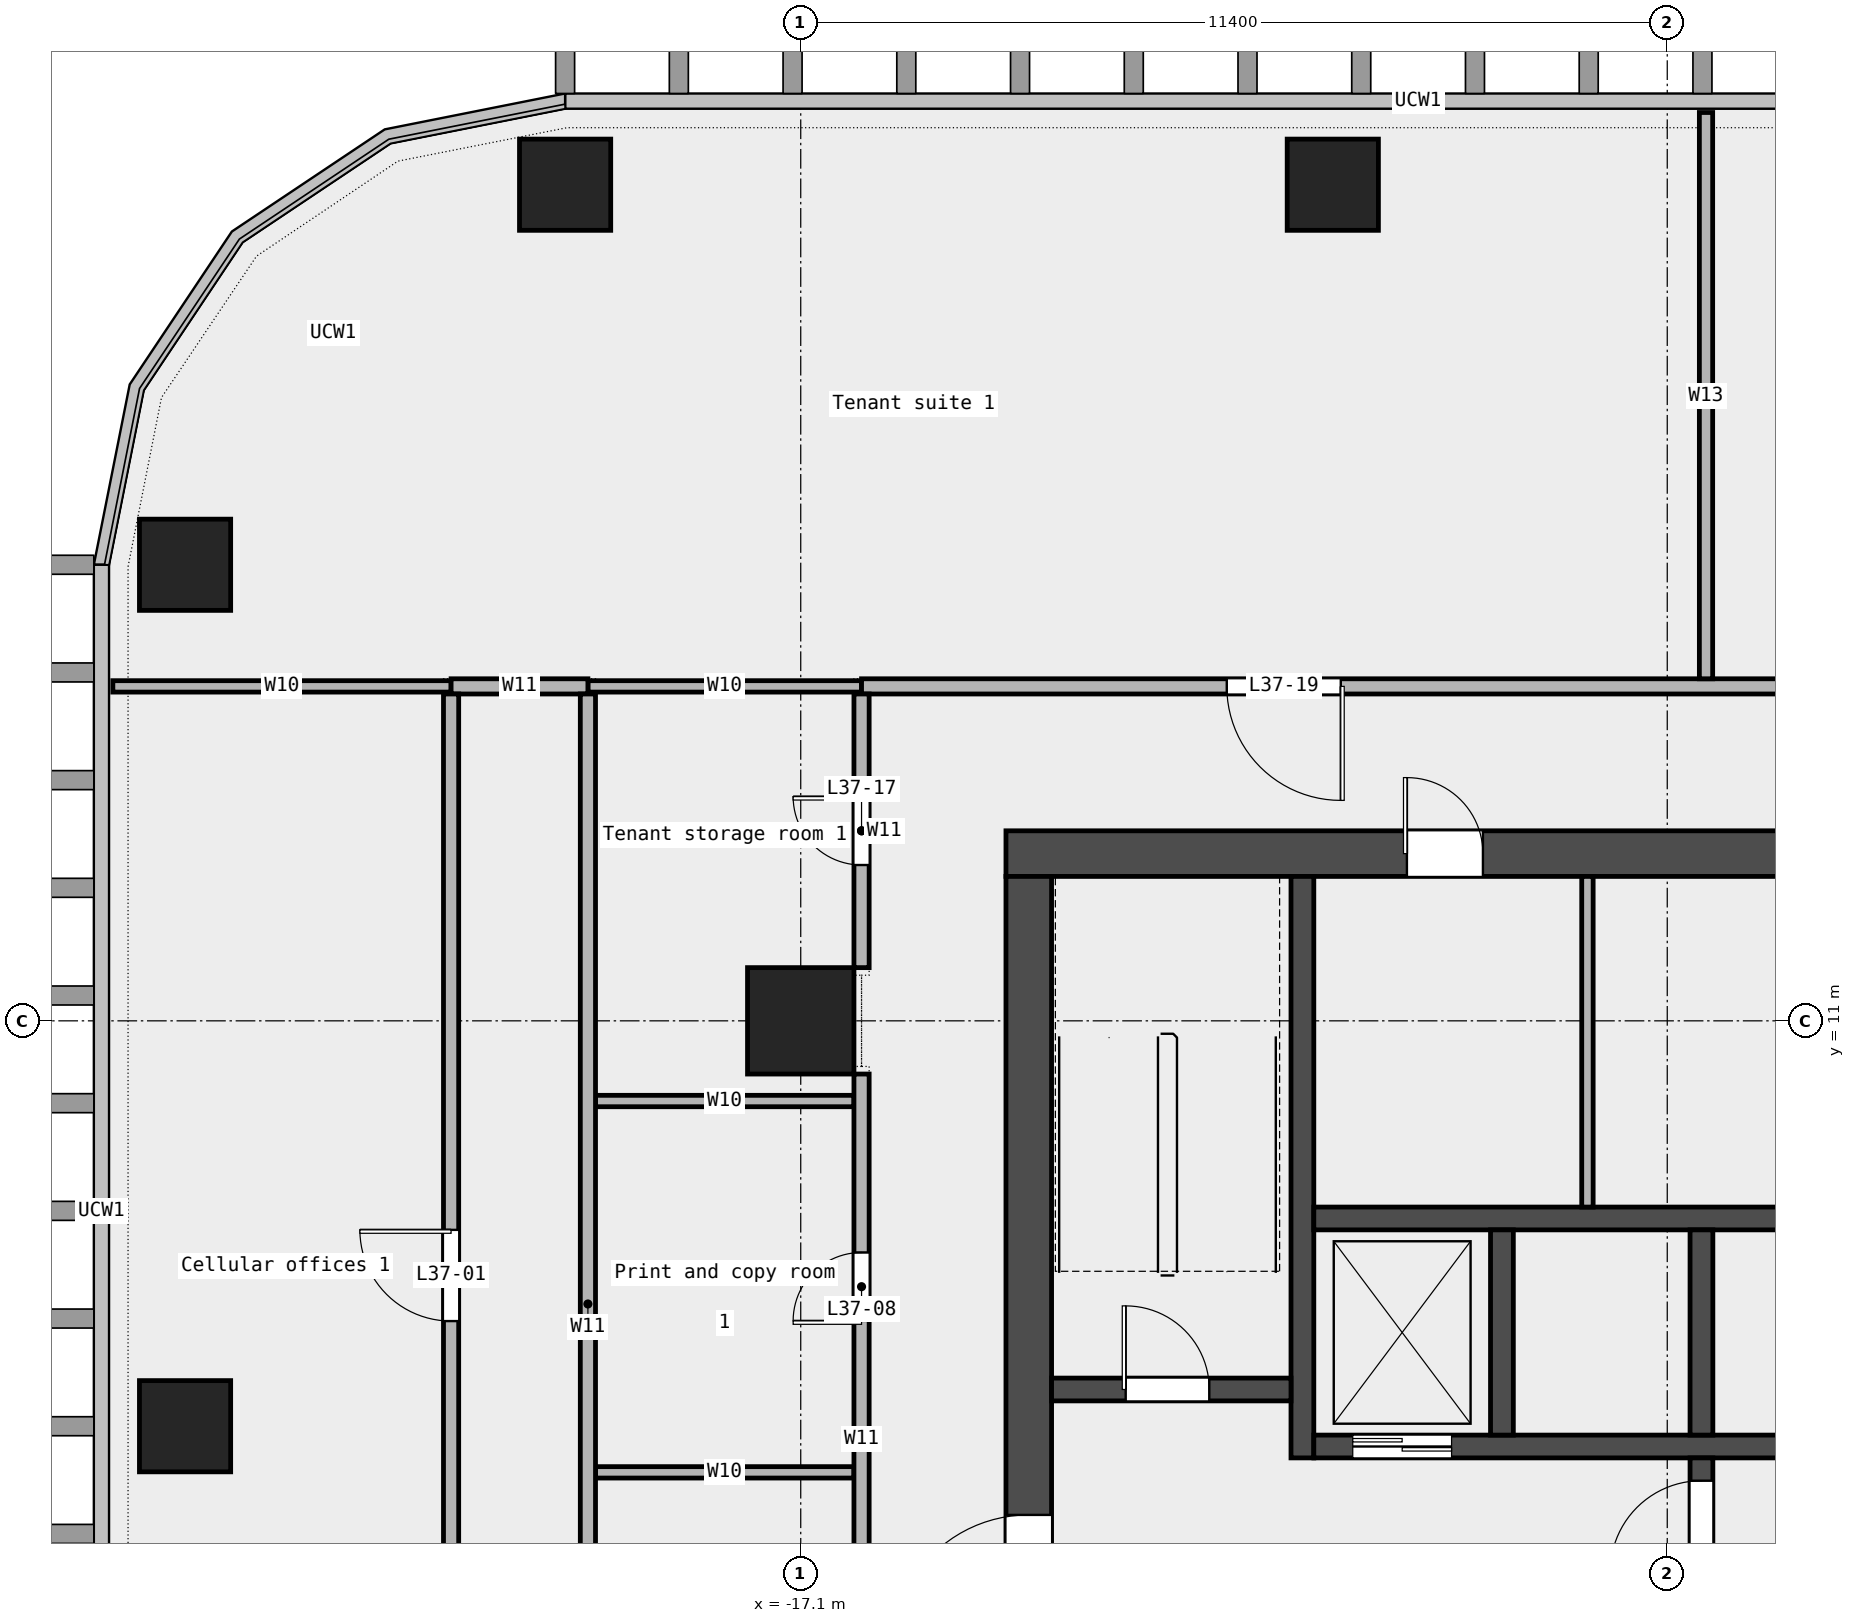
"""IFC4 building model, lengths in metres.
Left out: names, types, materials, properties, quantities, classifications, styles, units other than length and angle.
Written with IfcOpenShell. Run it as: python <this file> out.ifc"""

import sys

from ifc_helpers import new_model, si_unit, direction, frame, frame_2d, origin, origin_2d, place, context, subcontext, project, spatial, rectangle, extrude, element, fill, save


model = new_model("IFC4")
c1 = context("Model", 3, precision=1e-05, world=origin(), true_north=direction((0.0, 1.0)))
c2 = subcontext(c1, "Body", "Model", "MODEL_VIEW")
j1 = project(units=[si_unit("LENGTHUNIT", "METRE"), si_unit("PLANEANGLEUNIT", "RADIAN")], contexts=[c1])
p1 = place(None, origin())
s1 = spatial("IfcSite", under=j1, at=p1, CompositionType="ELEMENT")
p2 = place(p1, origin())
s2 = spatial("IfcBuilding", under=s1, at=p2, CompositionType="ELEMENT")
p3 = place(p2, frame((0.0, 0.0, 181.0)))
s3 = spatial("IfcBuildingStorey", under=s2, at=p3, CompositionType="ELEMENT", Elevation=181.0)
for number, where, z_axis, x_axis in (
    (1, (-10.1, 22.0, 0.0), (0.0, 0.0, 1.0), (1.0, 0.0, 0.0)),
    (2, (-20.2, 22.0, 0.0), (0.0, 0.0, 1.0), (1.0, 0.0, 0.0)),
    (3, (-25.2, 17.0, 0.0), (0.0, 0.0, 1.0), (1.0, 0.0, 0.0)),
    (4, (-25.2, 5.667, 0.0), (0.0, 0.0, 1.0), (1.0, 0.0, 0.0)),
):
    element("IfcColumn", number, at=place(p3, frame(where, z_axis=z_axis, x_axis=x_axis)), inside=s3, PredefinedType="COLUMN", context=c2, shape_type="SweptSolid", body=[
        extrude(rectangle(XDim=1.2, YDim=1.2, at=origin_2d()), origin(), (0.0, 0.0, 1.0), 3.6),
    ])
p4 = place(p3, frame((-17.1, 11.0, 0.0), z_axis=(0.0, 0.0, 1.0), x_axis=(1.0, 0.0, 0.0)))
e5 = element("IfcColumn", 5, at=p4, inside=s3, PredefinedType="COLUMN", context=c2, shape_type="SweptSolid", body=[
    extrude(rectangle(XDim=1.4, YDim=1.4, at=origin_2d()), origin(), (0.0, 0.0, 1.0), 3.6),
])
for number, where, z_axis, x_axis in (
    (6, (-19.8, 5.06, 0.0), (0.0, 0.0, 1.0), (1.0, 0.0, 0.0)),
    (7, (-19.8, 9.945, 0.0), (0.0, 0.0, 1.0), (1.0, 0.0, 0.0)),
):
    element("IfcWall", number, at=place(p3, frame(where, z_axis=z_axis, x_axis=x_axis)), inside=s3, PredefinedType="PARTITIONING", context=c2, shape_type="SweptSolid", body=[
        extrude(rectangle(XDim=3.4, YDim=0.15, at=frame_2d((1.7, 0.0))), origin(), (0.0, 0.0, 1.0), 3.6),
    ])
p5 = place(p3, frame((-26.15, 15.4, 0.0), z_axis=(0.0, 0.0, 1.0), x_axis=(1.0, 0.0, 0.0)))
e8 = element("IfcWall", 8, at=p5, inside=s3, PredefinedType="PARTITIONING", context=c2, shape_type="SweptSolid", body=[
    extrude(rectangle(XDim=4.45, YDim=0.15, at=frame_2d((2.225, 0.0))), origin(), (0.0, 0.0, 1.0), 3.6),
])
p6 = place(p3, frame((-19.9, 15.4, 0.0), z_axis=(0.0, 0.0, 1.0), x_axis=(1.0, 0.0, 0.0)))
e9 = element("IfcWall", 9, at=p6, inside=s3, PredefinedType="PARTITIONING", context=c2, shape_type="SweptSolid", body=[
    extrude(rectangle(XDim=3.6, YDim=0.15, at=frame_2d((1.8, 0.0))), origin(), (0.0, 0.0, 1.0), 3.6),
])
p7 = place(p3, frame((-21.7, 15.4, 0.0), z_axis=(0.0, 0.0, 1.0), x_axis=(1.0, 0.0, 0.0)))
e10 = element("IfcWall", 10, at=p7, inside=s3, PredefinedType="PARTITIONING", context=c2, shape_type="SweptSolid", body=[
    extrude(rectangle(XDim=1.8, YDim=0.2, at=frame_2d((0.9, 0.0))), origin(), (0.0, 0.0, 1.0), 3.6),
])
p8 = place(p3, frame((-16.3, 15.4, 0.0), z_axis=(0.0, 0.0, 1.0), x_axis=(1.0, 0.0, 0.0)))
e11 = element("IfcWall", 11, at=p8, inside=s3, PredefinedType="PARTITIONING", context=c2, shape_type="SweptSolid", body=[
    extrude(rectangle(XDim=32.6, YDim=0.2, at=frame_2d((16.3, 0.0))), origin(), (0.0, 0.0, 1.0), 3.6),
])
p9 = place(p8, frame((24.677, 0.0, 0.0)))
e12 = element("IfcOpeningElement", 12, at=p9, cuts=e11, PredefinedType="OPENING", context=c2, shape_type="SweptSolid", body=[
    extrude(rectangle(XDim=1.2, YDim=2.1, at=frame_2d((0.6, 1.05))), frame((0.0, 0.112, 0.0), z_axis=(0.0, -1.0, 0.0), x_axis=(1.0, 0.0, 0.0)), (0.0, 0.0, 1.0), 0.224),
])
p10 = place(p8, frame((4.805, 0.0, 0.0)))
e13 = element("IfcOpeningElement", 13, at=p10, cuts=e11, PredefinedType="OPENING", context=c2, shape_type="SweptSolid", body=[
    extrude(rectangle(XDim=1.5, YDim=2.1, at=frame_2d((0.75, 1.05))), frame((0.0, 0.112, 0.0), z_axis=(0.0, -1.0, 0.0), x_axis=(1.0, 0.0, 0.0)), (0.0, 0.0, 1.0), 0.224),
])
p11 = place(p8, frame((14.228, 0.0, 0.0)))
e14 = element("IfcOpeningElement", 14, at=p11, cuts=e11, PredefinedType="OPENING", context=c2, shape_type="SweptSolid", body=[
    extrude(rectangle(XDim=1.2, YDim=2.1, at=frame_2d((0.6, 1.05))), frame((0.0, 0.112, 0.0), z_axis=(0.0, -1.0, 0.0), x_axis=(1.0, 0.0, 0.0)), (0.0, 0.0, 1.0), 0.224),
])
p12 = place(p3, frame((-21.7, -9.0, 0.0), z_axis=(0.0, 0.0, 1.0), x_axis=(0.0, 1.0, 0.0)))
e15 = element("IfcWall", 15, at=p12, inside=s3, PredefinedType="PARTITIONING", context=c2, shape_type="SweptSolid", body=[
    extrude(rectangle(XDim=24.3, YDim=0.2, at=frame_2d((12.15, 0.0))), origin(), (0.0, 0.0, 1.0), 3.6),
])
p13 = place(p12, frame((16.05, 0.0, 0.0)))
e16 = element("IfcOpeningElement", 16, at=p13, cuts=e15, PredefinedType="OPENING", context=c2, shape_type="SweptSolid", body=[
    extrude(rectangle(XDim=1.2, YDim=2.1, at=frame_2d((0.6, 1.05))), frame((0.0, 0.112, 0.0), z_axis=(0.0, -1.0, 0.0), x_axis=(1.0, 0.0, 0.0)), (0.0, 0.0, 1.0), 0.224),
])
p14 = place(p3, frame((-19.9, -0.75, 0.0), z_axis=(0.0, 0.0, 1.0), x_axis=(0.0, 1.0, 0.0)))
e17 = element("IfcWall", 17, at=p14, inside=s3, PredefinedType="PARTITIONING", context=c2, shape_type="SweptSolid", body=[
    extrude(rectangle(XDim=16.05, YDim=0.2, at=frame_2d((8.025, 0.0))), origin(), (0.0, 0.0, 1.0), 3.6),
])
p15 = place(p3, frame((-16.3, 0.7, 0.0), z_axis=(0.0, 0.0, 1.0), x_axis=(0.0, 1.0, 0.0)))
e18 = element("IfcWall", 18, at=p15, inside=s3, PredefinedType="PARTITIONING", context=c2, shape_type="SweptSolid", body=[
    extrude(rectangle(XDim=9.6, YDim=0.2, at=frame_2d((4.8, 0.0))), origin(), (0.0, 0.0, 1.0), 3.6),
])
p16 = place(p15, frame((1.73, 0.0, 0.0)))
e19 = element("IfcOpeningElement", 19, at=p16, cuts=e18, PredefinedType="OPENING", context=c2, shape_type="SweptSolid", body=[
    extrude(rectangle(XDim=0.9, YDim=2.1, at=frame_2d((0.45, 1.05))), frame((0.0, 0.112, 0.0), z_axis=(0.0, -1.0, 0.0), x_axis=(1.0, 0.0, 0.0)), (0.0, 0.0, 1.0), 0.224),
])
p17 = place(p15, frame((6.353, 0.0, 0.0)))
e20 = element("IfcOpeningElement", 20, at=p17, cuts=e18, PredefinedType="OPENING", context=c2, shape_type="SweptSolid", body=[
    extrude(rectangle(XDim=0.9, YDim=2.1, at=frame_2d((0.45, 1.05))), frame((0.0, 0.112, 0.0), z_axis=(0.0, -1.0, 0.0), x_axis=(1.0, 0.0, 0.0)), (0.0, 0.0, 1.0), 0.224),
])
p18 = place(p3, frame((-16.3, 11.7, 0.0), z_axis=(0.0, 0.0, 1.0), x_axis=(0.0, 1.0, 0.0)))
e21 = element("IfcWall", 21, at=p18, inside=s3, PredefinedType="PARTITIONING", context=c2, shape_type="SweptSolid", body=[
    extrude(rectangle(XDim=3.6, YDim=0.2, at=frame_2d((1.8, 0.0))), origin(), (0.0, 0.0, 1.0), 3.6),
])
p19 = place(p18, frame((1.35, 0.0, 0.0)))
e22 = element("IfcOpeningElement", 22, at=p19, cuts=e21, PredefinedType="OPENING", context=c2, shape_type="SweptSolid", body=[
    extrude(rectangle(XDim=0.9, YDim=2.1, at=frame_2d((0.45, 1.05))), frame((0.0, 0.112, 0.0), z_axis=(0.0, -1.0, 0.0), x_axis=(1.0, 0.0, 0.0)), (0.0, 0.0, 1.0), 0.224),
])
p20 = place(p3, frame((-5.19, 15.5, 0.0), z_axis=(0.0, 0.0, 1.0), x_axis=(0.0, 1.0, 0.0)))
e23 = element("IfcWall", 23, at=p20, inside=s3, PredefinedType="PARTITIONING", context=c2, shape_type="SweptSolid", body=[
    extrude(rectangle(XDim=7.45, YDim=0.175, at=frame_2d((3.725, 0.0))), origin(), (0.0, 0.0, 1.0), 3.6),
])
p21 = place(p3, frame((-14.4, 13.2, 0.0), z_axis=(0.0, 0.0, 1.0), x_axis=(1.0, 0.0, 0.0)))
e24 = element("IfcWall", 24, at=p21, inside=s3, PredefinedType="SHEAR", context=c2, shape_type="SweptSolid", body=[
    extrude(rectangle(XDim=28.8, YDim=0.6, at=frame_2d((14.4, 0.0))), origin(), (0.0, 0.0, 1.0), 3.7),
])
p22 = place(p21, frame((5.275, 0.0, 0.0)))
e25 = element("IfcOpeningElement", 25, at=p22, cuts=e24, PredefinedType="OPENING", context=c2, shape_type="SweptSolid", body=[
    extrude(rectangle(XDim=1.0, YDim=2.1, at=frame_2d((0.5, 1.05))), frame((0.0, 0.312, 0.0), z_axis=(0.0, -1.0, 0.0), x_axis=(1.0, 0.0, 0.0)), (0.0, 0.0, 1.0), 0.624),
])
p23 = place(p21, frame((10.525, 0.0, 0.0)))
e26 = element("IfcOpeningElement", 26, at=p23, cuts=e24, PredefinedType="OPENING", context=c2, shape_type="SweptSolid", body=[
    extrude(rectangle(XDim=1.0, YDim=2.1, at=frame_2d((0.5, 1.05))), frame((0.0, 0.312, 0.0), z_axis=(0.0, -1.0, 0.0), x_axis=(1.0, 0.0, 0.0)), (0.0, 0.0, 1.0), 0.624),
])
p24 = place(p21, frame((15.587, 0.0, 0.0)))
e27 = element("IfcOpeningElement", 27, at=p24, cuts=e24, PredefinedType="OPENING", context=c2, shape_type="SweptSolid", body=[
    extrude(rectangle(XDim=1.0, YDim=2.1, at=frame_2d((0.5, 1.05))), frame((0.0, 0.312, 0.0), z_axis=(0.0, -1.0, 0.0), x_axis=(1.0, 0.0, 0.0)), (0.0, 0.0, 1.0), 0.624),
])
p25 = place(p21, frame((19.15, 0.0, 0.0)))
e28 = element("IfcOpeningElement", 28, at=p25, cuts=e24, PredefinedType="OPENING", context=c2, shape_type="SweptSolid", body=[
    extrude(rectangle(XDim=1.0, YDim=2.1, at=frame_2d((0.5, 1.05))), frame((0.0, 0.312, 0.0), z_axis=(0.0, -1.0, 0.0), x_axis=(1.0, 0.0, 0.0)), (0.0, 0.0, 1.0), 0.624),
])
p26 = place(p21, frame((22.712, 0.0, 0.0)))
e29 = element("IfcOpeningElement", 29, at=p26, cuts=e24, PredefinedType="OPENING", context=c2, shape_type="SweptSolid", body=[
    extrude(rectangle(XDim=1.0, YDim=2.1, at=frame_2d((0.5, 1.05))), frame((0.0, 0.312, 0.0), z_axis=(0.0, -1.0, 0.0), x_axis=(1.0, 0.0, 0.0)), (0.0, 0.0, 1.0), 0.624),
])
p27 = place(p3, frame((-14.1, -6.6, 0.0), z_axis=(0.0, 0.0, 1.0), x_axis=(0.0, 1.0, 0.0)))
e30 = element("IfcWall", 30, at=p27, inside=s3, PredefinedType="SHEAR", context=c2, shape_type="SweptSolid", body=[
    extrude(rectangle(XDim=19.5, YDim=0.6, at=frame_2d((9.75, 0.0))), origin(), (0.0, 0.0, 1.0), 3.7),
])
p28 = place(p27, frame((9.3, 0.0, 0.0)))
e31 = element("IfcOpeningElement", 31, at=p28, cuts=e30, PredefinedType="OPENING", context=c2, shape_type="SweptSolid", body=[
    extrude(rectangle(XDim=1.8, YDim=2.1, at=frame_2d((0.9, 1.05))), frame((0.0, 0.312, 0.0), z_axis=(0.0, -1.0, 0.0), x_axis=(1.0, 0.0, 0.0)), (0.0, 0.0, 1.0), 0.624),
])
p29 = place(p3, frame((-10.5, 5.25, 0.0), z_axis=(0.0, 0.0, 1.0), x_axis=(0.0, 1.0, 0.0)))
e32 = element("IfcWall", 32, at=p29, inside=s3, PredefinedType="SHEAR", context=c2, shape_type="SweptSolid", body=[
    extrude(rectangle(XDim=7.65, YDim=0.3, at=frame_2d((3.825, 0.0))), origin(), (0.0, 0.0, 1.0), 3.7),
])
p30 = place(p3, frame((-13.8, 6.15, 0.0), z_axis=(0.0, 0.0, 1.0), x_axis=(1.0, 0.0, 0.0)))
e33 = element("IfcWall", 33, at=p30, inside=s3, PredefinedType="SOLIDWALL", context=c2, shape_type="SweptSolid", body=[
    extrude(rectangle(XDim=3.15, YDim=0.3, at=frame_2d((1.575, 0.0))), origin(), (0.0, 0.0, 1.0), 3.7),
])
p31 = place(p30, frame((0.975, 0.0, 0.0)))
e34 = element("IfcOpeningElement", 34, at=p31, cuts=e33, PredefinedType="OPENING", context=c2, shape_type="SweptSolid", body=[
    extrude(rectangle(XDim=1.1, YDim=2.1, at=frame_2d((0.55, 1.05))), frame((0.0, 0.162, 0.0), z_axis=(0.0, -1.0, 0.0), x_axis=(1.0, 0.0, 0.0)), (0.0, 0.0, 1.0), 0.324),
])
p32 = place(p3, frame((-10.35, 5.4, 0.0), z_axis=(0.0, 0.0, 1.0), x_axis=(1.0, 0.0, 0.0)))
e35 = element("IfcWall", 35, at=p32, inside=s3, PredefinedType="SOLIDWALL", context=c2, shape_type="SweptSolid", body=[
    extrude(rectangle(XDim=20.7, YDim=0.3, at=frame_2d((10.35, 0.0))), origin(), (0.0, 0.0, 1.0), 3.7),
])
p33 = place(p32, frame((0.512, 0.0, 0.0)))
e36 = element("IfcOpeningElement", 36, at=p33, cuts=e35, PredefinedType="OPENING", context=c2, shape_type="SweptSolid", body=[
    extrude(rectangle(XDim=1.3, YDim=2.1, at=frame_2d((0.65, 1.05))), frame((0.0, 0.162, 0.0), z_axis=(0.0, -1.0, 0.0), x_axis=(1.0, 0.0, 0.0)), (0.0, 0.0, 1.0), 0.324),
])
p34 = place(p3, frame((-10.35, 8.4, 0.0), z_axis=(0.0, 0.0, 1.0), x_axis=(1.0, 0.0, 0.0)))
e37 = element("IfcWall", 37, at=p34, inside=s3, PredefinedType="SOLIDWALL", context=c2, shape_type="SweptSolid", body=[
    extrude(rectangle(XDim=20.7, YDim=0.3, at=frame_2d((10.35, 0.0))), origin(), (0.0, 0.0, 1.0), 3.7),
])
for number, where, z_axis, x_axis in (
    (38, (-7.875, 5.55, 0.0), (0.0, 0.0, 1.0), (0.0, 1.0, 0.0)),
    (39, (-5.25, 5.55, 0.0), (0.0, 0.0, 1.0), (0.0, 1.0, 0.0)),
):
    element("IfcWall", number, at=place(p3, frame(where, z_axis=z_axis, x_axis=x_axis)), inside=s3, PredefinedType="SOLIDWALL", context=c2, shape_type="SweptSolid", body=[
        extrude(rectangle(XDim=2.7, YDim=0.3, at=frame_2d((1.35, 0.0))), origin(), (0.0, 0.0, 1.0), 3.7),
    ])
p35 = place(p3, frame((-5.25, 1.95, 0.0), z_axis=(0.0, 0.0, 1.0), x_axis=(0.0, 1.0, 0.0)))
e40 = element("IfcWall", 40, at=p35, inside=s3, PredefinedType="SOLIDWALL", context=c2, shape_type="SweptSolid", body=[
    extrude(rectangle(XDim=3.3, YDim=0.3, at=frame_2d((1.65, 0.0))), origin(), (0.0, 0.0, 1.0), 3.7),
])
p36 = place(p35, frame((0.3, 0.0, 0.0)))
e41 = element("IfcOpeningElement", 41, at=p36, cuts=e40, PredefinedType="OPENING", context=c2, shape_type="SweptSolid", body=[
    extrude(rectangle(XDim=1.2, YDim=2.1, at=frame_2d((0.6, 1.05))), frame((0.0, 0.162, 0.0), z_axis=(0.0, -1.0, 0.0), x_axis=(1.0, 0.0, 0.0)), (0.0, 0.0, 1.0), 0.324),
])
p37 = place(p35, frame((1.8, 0.0, 0.0)))
e42 = element("IfcOpeningElement", 42, at=p37, cuts=e40, PredefinedType="OPENING", context=c2, shape_type="SweptSolid", body=[
    extrude(rectangle(XDim=1.2, YDim=2.1, at=frame_2d((0.6, 1.05))), frame((0.0, 0.162, 0.0), z_axis=(0.0, -1.0, 0.0), x_axis=(1.0, 0.0, 0.0)), (0.0, 0.0, 1.0), 0.324),
])
p38 = place(p3, frame((-6.75, 8.55, 0.0), z_axis=(0.0, 0.0, 1.0), x_axis=(0.0, 1.0, 0.0)))
e43 = element("IfcWall", 43, at=p38, inside=s3, PredefinedType="PARTITIONING", context=c2, shape_type="SweptSolid", body=[
    extrude(rectangle(XDim=4.35, YDim=0.15, at=frame_2d((2.175, 0.0))), origin(), (0.0, 0.0, 1.0), 3.7),
])
p39 = place(p13, origin())
e44 = element("IfcDoor", 44, at=p39, inside=s3, OperationType="SINGLE_SWING_RIGHT", PredefinedType="DOOR", context=c2, shape_type="SweptSolid", body=[
    extrude(rectangle(XDim=1.2, YDim=2.1, at=frame_2d((0.6, 1.05))), frame((0.0, 0.025, 0.0), z_axis=(0.0, -1.0, 0.0), x_axis=(1.0, 0.0, 0.0)), (0.0, 0.0, 1.0), 0.05),
])
fill(e16, e44)
p40 = place(p17, origin())
e45 = element("IfcDoor", 45, at=p40, inside=s3, OperationType="SINGLE_SWING_LEFT", PredefinedType="DOOR", context=c2, shape_type="SweptSolid", body=[
    extrude(rectangle(XDim=0.9, YDim=2.1, at=frame_2d((0.45, 1.05))), frame((0.0, 0.025, 0.0), z_axis=(0.0, -1.0, 0.0), x_axis=(1.0, 0.0, 0.0)), (0.0, 0.0, 1.0), 0.05),
])
fill(e20, e45)
p41 = place(p19, origin())
e46 = element("IfcDoor", 46, at=p41, inside=s3, OperationType="SINGLE_SWING_RIGHT", PredefinedType="DOOR", context=c2, shape_type="SweptSolid", body=[
    extrude(rectangle(XDim=0.9, YDim=2.1, at=frame_2d((0.45, 1.05))), frame((0.0, 0.025, 0.0), z_axis=(0.0, -1.0, 0.0), x_axis=(1.0, 0.0, 0.0)), (0.0, 0.0, 1.0), 0.05),
])
fill(e22, e46)
p42 = place(p10, origin())
e47 = element("IfcDoor", 47, at=p42, inside=s3, OperationType="DOUBLE_DOOR_SINGLE_SWING", PredefinedType="DOOR", context=c2, shape_type="SweptSolid", body=[
    extrude(rectangle(XDim=1.5, YDim=2.1, at=frame_2d((0.75, 1.05))), frame((0.0, 0.025, 0.0), z_axis=(0.0, -1.0, 0.0), x_axis=(1.0, 0.0, 0.0)), (0.0, 0.0, 1.0), 0.05),
])
fill(e13, e47)
p43 = place(p31, origin())
e48 = element("IfcDoor", 48, at=p43, inside=s3, OperationType="SINGLE_SWING_LEFT", PredefinedType="DOOR", context=c2, shape_type="SweptSolid", body=[
    extrude(rectangle(XDim=1.1, YDim=2.1, at=frame_2d((0.55, 1.05))), frame((0.0, 0.025, 0.0), z_axis=(0.0, -1.0, 0.0), x_axis=(1.0, 0.0, 0.0)), (0.0, 0.0, 1.0), 0.05),
])
fill(e34, e48)
p44 = place(p28, origin())
e49 = element("IfcDoor", 49, at=p44, inside=s3, OperationType="DOUBLE_DOOR_SINGLE_SWING", PredefinedType="DOOR", context=c2, shape_type="SweptSolid", body=[
    extrude(rectangle(XDim=1.8, YDim=2.1, at=frame_2d((0.9, 1.05))), frame((0.0, 0.025, 0.0), z_axis=(0.0, -1.0, 0.0), x_axis=(1.0, 0.0, 0.0)), (0.0, 0.0, 1.0), 0.05),
])
fill(e31, e49)
p45 = place(p37, origin())
e50 = element("IfcDoor", 50, at=p45, inside=s3, OperationType="SINGLE_SWING_RIGHT", PredefinedType="DOOR", context=c2, shape_type="SweptSolid", body=[
    extrude(rectangle(XDim=1.2, YDim=2.1, at=frame_2d((0.6, 1.05))), frame((0.0, 0.025, 0.0), z_axis=(0.0, -1.0, 0.0), x_axis=(1.0, 0.0, 0.0)), (0.0, 0.0, 1.0), 0.05),
])
fill(e42, e50)
p46 = place(p33, origin())
e51 = element("IfcDoor", 51, at=p46, inside=s3, OperationType="DOUBLE_DOOR_SLIDING", PredefinedType="DOOR", context=c2, shape_type="SweptSolid", body=[
    extrude(rectangle(XDim=1.3, YDim=2.1, at=frame_2d((0.65, 1.05))), frame((0.0, 0.025, 0.0), z_axis=(0.0, -1.0, 0.0), x_axis=(1.0, 0.0, 0.0)), (0.0, 0.0, 1.0), 0.05),
])
fill(e36, e51)
p47 = place(p22, origin())
e52 = element("IfcDoor", 52, at=p47, inside=s3, OperationType="SINGLE_SWING_LEFT", PredefinedType="DOOR", context=c2, shape_type="SweptSolid", body=[
    extrude(rectangle(XDim=1.0, YDim=2.1, at=frame_2d((0.5, 1.05))), frame((0.0, 0.025, 0.0), z_axis=(0.0, -1.0, 0.0), x_axis=(1.0, 0.0, 0.0)), (0.0, 0.0, 1.0), 0.05),
])
fill(e25, e52)
save(model, sys.argv[1])
